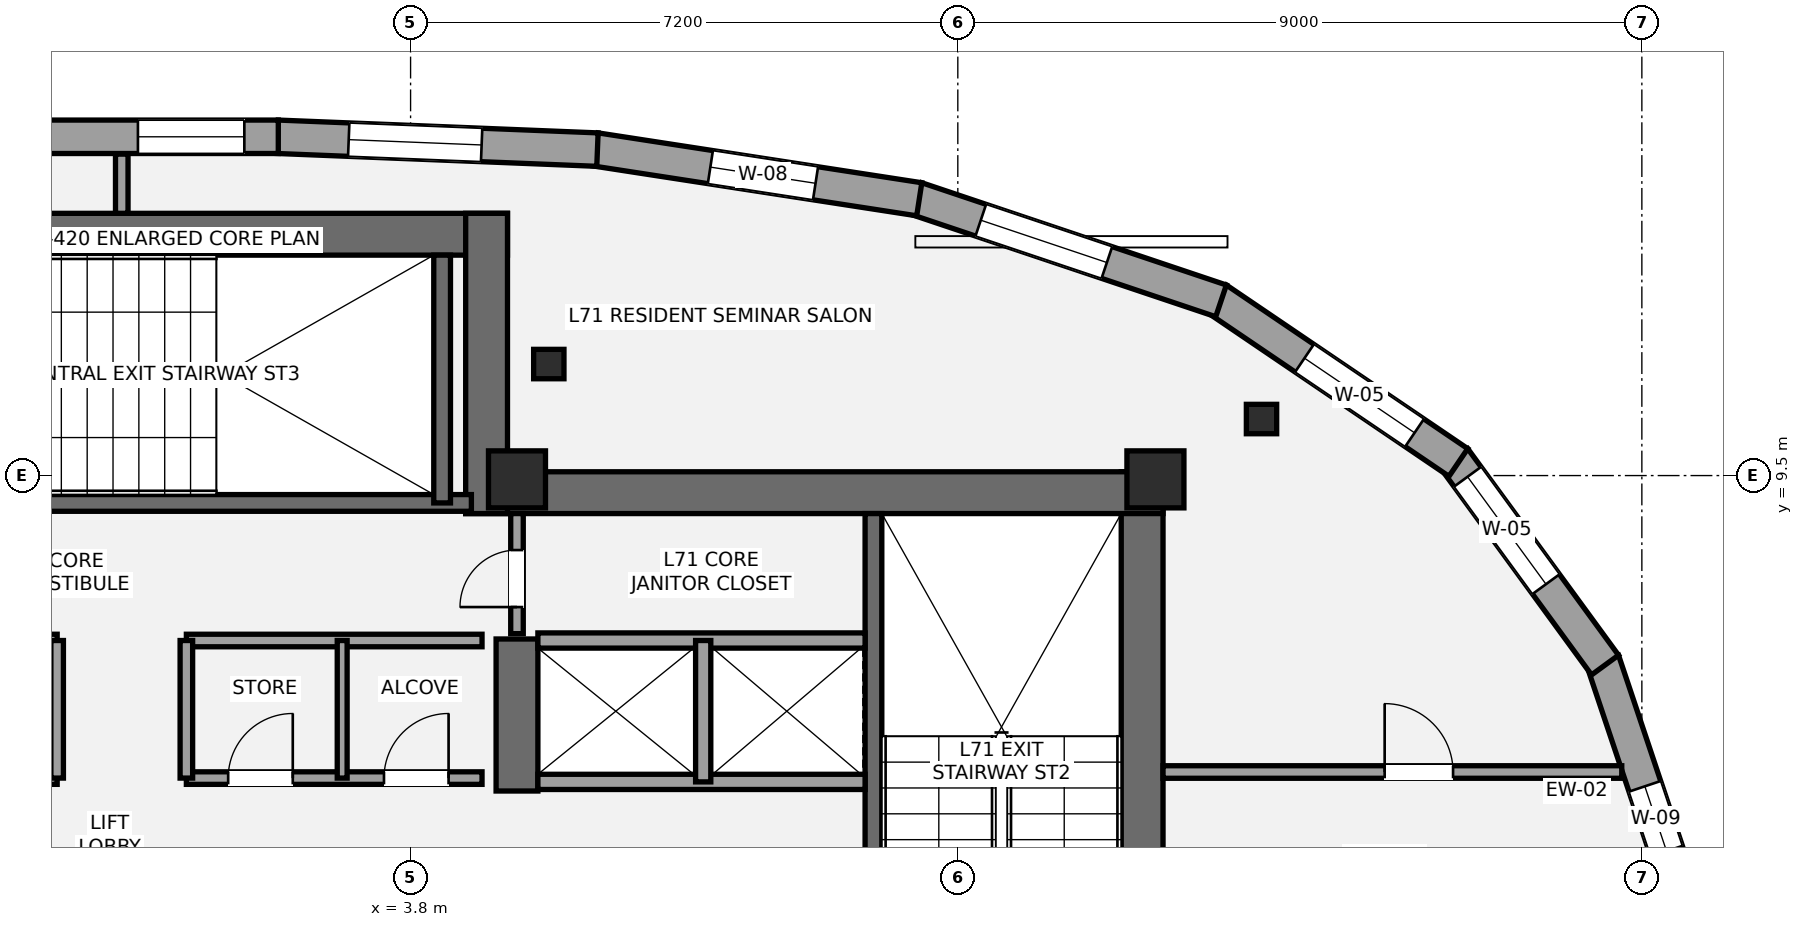
"""IFC4 building model, lengths in metres.
Left out: names, types, materials, properties, quantities, classifications, styles, units other than length and angle.
Written with IfcOpenShell. Run it as: python <this file> out.ifc"""

import sys

from ifc_helpers import new_model, si_unit, direction, frame, frame_2d, origin, origin_2d, place, context, subcontext, project, spatial, rectangle, i_section, extrude, element, fill, save


model = new_model("IFC4")
c1 = context("Model", 3, precision=1e-05, world=origin(), true_north=direction((0.0, 1.0)))
c2 = subcontext(c1, "Body", "Model", "MODEL_VIEW")
j1 = project(units=[si_unit("LENGTHUNIT", "METRE"), si_unit("PLANEANGLEUNIT", "RADIAN")], contexts=[c1])
p1 = place(None, origin())
s1 = spatial("IfcSite", under=j1, at=p1, CompositionType="ELEMENT")
p2 = place(p1, origin())
s2 = spatial("IfcBuilding", under=s1, at=p2, CompositionType="ELEMENT")
p3 = place(p2, frame((0.0, 0.0, 250.95)))
s3 = spatial("IfcBuildingStorey", under=s2, at=p3, CompositionType="ELEMENT", Elevation=250.95)
p4 = place(p3, frame((13.425, 1.3, 0.0), z_axis=(0.0, 0.0, 1.0), x_axis=(0.0, 1.0, 0.0)))
e1 = element("IfcWall", 1, at=p4, inside=s3, PredefinedType="SHEAR", context=c2, shape_type="SweptSolid", body=[
    extrude(rectangle(XDim=8.25, YDim=0.55, at=frame_2d((4.125, 0.0))), origin(), (0.0, 0.0, 1.0), 3.15),
])
p5 = place(p3, frame((4.525, 9.275, 0.0), z_axis=(0.0, 0.0, 1.0), x_axis=(1.0, 0.0, 0.0)))
e2 = element("IfcWall", 2, at=p5, inside=s3, PredefinedType="SHEAR", context=c2, shape_type="SweptSolid", body=[
    extrude(rectangle(XDim=9.175, YDim=0.55, at=frame_2d((4.587, 0.0))), origin(), (0.0, 0.0, 1.0), 3.15),
])
p6 = place(p3, frame((5.2, 5.35, 0.0), z_axis=(0.0, 0.0, 1.0), x_axis=(0.0, 1.0, 0.0)))
e3 = element("IfcWall", 3, at=p6, inside=s3, PredefinedType="SHEAR", context=c2, shape_type="SweptSolid", body=[
    extrude(rectangle(XDim=2.0, YDim=0.55, at=frame_2d((1.0, 0.0))), origin(), (0.0, 0.0, 1.0), 3.15),
])
p7 = place(p3, frame((9.89, 1.85, 0.0), z_axis=(0.0, 0.0, 1.0), x_axis=(0.0, 1.0, 0.0)))
e4 = element("IfcWall", 4, at=p7, inside=s3, PredefinedType="SHEAR", context=c2, shape_type="SweptSolid", body=[
    extrude(rectangle(XDim=7.15, YDim=0.22, at=frame_2d((3.575, 0.0))), origin(), (0.0, 0.0, 1.0), 3.15),
])
p8 = place(p3, frame((-5.075, 12.675, 0.0), z_axis=(0.0, 0.0, 1.0), x_axis=(1.0, 0.0, 0.0)))
e5 = element("IfcWall", 5, at=p8, inside=s3, PredefinedType="SHEAR", context=c2, shape_type="SweptSolid", body=[
    extrude(rectangle(XDim=10.15, YDim=0.55, at=frame_2d((5.075, 0.0))), origin(), (0.0, 0.0, 1.0), 3.15),
])
p9 = place(p3, frame((4.8, 9.0, 0.0), z_axis=(0.0, 0.0, 1.0), x_axis=(0.0, 1.0, 0.0)))
e6 = element("IfcWall", 6, at=p9, inside=s3, PredefinedType="SHEAR", context=c2, shape_type="SweptSolid", body=[
    extrude(rectangle(XDim=3.95, YDim=0.55, at=frame_2d((1.975, 0.0))), origin(), (0.0, 0.0, 1.0), 3.15),
])
p10 = place(p3, frame((-4.7, 9.14, 0.0), z_axis=(0.0, 0.0, 1.0), x_axis=(1.0, 0.0, 0.0)))
e7 = element("IfcWall", 7, at=p10, inside=s3, PredefinedType="SHEAR", context=c2, shape_type="SweptSolid", body=[
    extrude(rectangle(XDim=9.3, YDim=0.22, at=frame_2d((4.65, 0.0))), origin(), (0.0, 0.0, 1.0), 3.15),
])
p11 = place(p10, frame((1.15, 0.0, 0.0)))
e8 = element("IfcOpeningElement", 8, at=p11, cuts=e7, PredefinedType="OPENING", context=c2, shape_type="SweptSolid", body=[
    extrude(rectangle(XDim=1.05, YDim=2.15, at=frame_2d((0.525, 1.075))), frame((0.0, 0.12, 0.0), z_axis=(0.0, -1.0, 0.0), x_axis=(1.0, 0.0, 0.0)), (0.0, 0.0, 1.0), 0.24),
])
p12 = place(p3, frame((4.215, 9.14, 0.0), z_axis=(0.0, 0.0, 1.0), x_axis=(0.0, 1.0, 0.0)))
e9 = element("IfcWall", 9, at=p12, inside=s3, PredefinedType="SHEAR", context=c2, shape_type="SweptSolid", body=[
    extrude(rectangle(XDim=3.26, YDim=0.22, at=frame_2d((1.63, 0.0))), origin(), (0.0, 0.0, 1.0), 3.15),
])
for number, where, z_axis, x_axis in (
    (10, (5.2, 9.45, 0.0), (0.0, 0.0, 1.0), (1.0, 0.0, 0.0)),
    (11, (13.6, 9.45, 0.0), (0.0, 0.0, 1.0), (1.0, 0.0, 0.0)),
):
    element("IfcColumn", number, at=place(p3, frame(where, z_axis=z_axis, x_axis=x_axis)), inside=s3, PredefinedType="PILASTER", context=c2, shape_type="SweptSolid", body=[
        extrude(rectangle(XDim=0.75, YDim=0.75, at=origin_2d()), origin(), (0.0, 0.0, 1.0), 3.15),
    ])
for number, where, z_axis, x_axis in (
    (12, (14.996, 10.244, 0.0), (0.0, 0.0, 1.0), (1.0, 0.0, 0.0)),
    (13, (5.619, 10.967, 0.0), (0.0, 0.0, 1.0), (1.0, 0.0, 0.0)),
):
    element("IfcColumn", number, at=place(p3, frame(where, z_axis=z_axis, x_axis=x_axis)), inside=s3, PredefinedType="COLUMN", context=c2, shape_type="SweptSolid", body=[
        extrude(i_section(OverallWidth=0.399, OverallDepth=0.387, WebThickness=0.021, FlangeThickness=0.033, at=origin_2d()), origin(), (0.0, 0.0, 1.0), 3.15),
    ])
p13 = place(p3, frame((19.485, 7.067, 0.0), z_axis=(0.0, 0.0, 1.0), x_axis=(0.317622332961, -0.948217302945, 0.0)))
e14 = element("IfcWall", 14, at=p13, inside=s3, PredefinedType="STANDARD", context=c2, shape_type="SweptSolid", body=[
    extrude(rectangle(XDim=3.045, YDim=0.44, at=frame_2d((1.523, 0.0))), origin(), (0.0, 0.0, 1.0), 2.336),
])
p14 = place(p13, frame((1.746, 0.0, 0.58)))
e15 = element("IfcOpeningElement", 15, at=p14, cuts=e14, PredefinedType="OPENING", context=c2, shape_type="SweptSolid", body=[
    extrude(rectangle(XDim=0.9, YDim=1.35, at=frame_2d((0.45, 0.675))), frame((0.0, 0.23, 0.0), z_axis=(0.0, -1.0, 0.0), x_axis=(1.0, 0.0, 0.0)), (0.0, 0.0, 1.0), 0.46),
])
p15 = place(p3, frame((17.531, 9.724, 0.0), z_axis=(0.0, 0.0, 1.0), x_axis=(0.589698134284, -0.807623743102, 0.0)))
e16 = element("IfcWall", 16, at=p15, inside=s3, PredefinedType="STANDARD", context=c2, shape_type="SweptSolid", body=[
    extrude(rectangle(XDim=3.364, YDim=0.44, at=frame_2d((1.682, 0.0))), origin(), (0.0, 0.0, 1.0), 2.336),
])
p16 = place(p15, frame((0.297, 0.0, 0.55)))
e17 = element("IfcOpeningElement", 17, at=p16, cuts=e16, PredefinedType="OPENING", context=c2, shape_type="SweptSolid", body=[
    extrude(rectangle(XDim=1.75, YDim=1.55, at=frame_2d((0.875, 0.775))), frame((0.0, 0.23, 0.0), z_axis=(0.0, -1.0, 0.0), x_axis=(1.0, 0.0, 0.0)), (0.0, 0.0, 1.0), 0.46),
])
p17 = place(p3, frame((14.41, 11.825, 0.0), z_axis=(0.0, 0.0, 1.0), x_axis=(0.827707997274, -0.56115904274, 0.0)))
e18 = element("IfcWall", 18, at=p17, inside=s3, PredefinedType="STANDARD", context=c2, shape_type="SweptSolid", body=[
    extrude(rectangle(XDim=3.837, YDim=0.44, at=frame_2d((1.918, 0.0))), origin(), (0.0, 0.0, 1.0), 2.336),
])
p18 = place(p17, frame((1.391, 0.0, 0.55)))
e19 = element("IfcOpeningElement", 19, at=p18, cuts=e18, PredefinedType="OPENING", context=c2, shape_type="SweptSolid", body=[
    extrude(rectangle(XDim=1.75, YDim=1.55, at=frame_2d((0.875, 0.775))), frame((0.0, 0.23, 0.0), z_axis=(0.0, -1.0, 0.0), x_axis=(1.0, 0.0, 0.0)), (0.0, 0.0, 1.0), 0.46),
])
p19 = place(p3, frame((10.456, 13.144, 0.0), z_axis=(0.0, 0.0, 1.0), x_axis=(0.948005346594, -0.318254399545, 0.0)))
e20 = element("IfcWall", 20, at=p19, inside=s3, PredefinedType="STANDARD", context=c2, shape_type="SweptSolid", body=[
    extrude(rectangle(XDim=4.227, YDim=0.44, at=frame_2d((2.113, 0.0))), origin(), (0.0, 0.0, 1.0), 2.336),
])
p20 = place(p19, frame((0.892, 0.0, 0.55)))
e21 = element("IfcOpeningElement", 21, at=p20, cuts=e20, PredefinedType="OPENING", context=c2, shape_type="SweptSolid", body=[
    extrude(rectangle(XDim=1.75, YDim=1.55, at=frame_2d((0.875, 0.775))), frame((0.0, 0.23, 0.0), z_axis=(0.0, -1.0, 0.0), x_axis=(1.0, 0.0, 0.0)), (0.0, 0.0, 1.0), 0.46),
])
p21 = place(p3, frame((6.234, 13.791, 0.0), z_axis=(0.0, 0.0, 1.0), x_axis=(0.988352039028, -0.152184910389, 0.0)))
e22 = element("IfcWall", 22, at=p21, inside=s3, PredefinedType="STANDARD", context=c2, shape_type="SweptSolid", body=[
    extrude(rectangle(XDim=4.309, YDim=0.44, at=frame_2d((2.155, 0.0))), origin(), (0.0, 0.0, 1.0), 2.336),
])
p22 = place(p21, frame((1.528, 0.0, 0.55)))
e23 = element("IfcOpeningElement", 23, at=p22, cuts=e22, PredefinedType="OPENING", context=c2, shape_type="SweptSolid", body=[
    extrude(rectangle(XDim=1.4, YDim=1.55, at=frame_2d((0.7, 0.775))), frame((0.0, 0.23, 0.0), z_axis=(0.0, -1.0, 0.0), x_axis=(1.0, 0.0, 0.0)), (0.0, 0.0, 1.0), 0.46),
])
p23 = place(p3, frame((2.051, 13.957, 0.0), z_axis=(0.0, 0.0, 1.0), x_axis=(0.999195020948, -0.040116207618, 0.0)))
e24 = element("IfcWall", 24, at=p23, inside=s3, PredefinedType="STANDARD", context=c2, shape_type="SweptSolid", body=[
    extrude(rectangle(XDim=4.211, YDim=0.44, at=frame_2d((2.106, 0.0))), origin(), (0.0, 0.0, 1.0), 2.336),
])
p24 = place(p23, frame((0.936, 0.0, 0.55)))
e25 = element("IfcOpeningElement", 25, at=p24, cuts=e24, PredefinedType="OPENING", context=c2, shape_type="SweptSolid", body=[
    extrude(rectangle(XDim=1.75, YDim=1.55, at=frame_2d((0.875, 0.775))), frame((0.0, 0.23, 0.0), z_axis=(0.0, -1.0, 0.0), x_axis=(1.0, 0.0, 0.0)), (0.0, 0.0, 1.0), 0.46),
])
p25 = place(p3, frame((-2.059, 13.957, 0.0), z_axis=(0.0, 0.0, 1.0), x_axis=(1.0, 0.0, 0.0)))
e26 = element("IfcWall", 26, at=p25, inside=s3, PredefinedType="STANDARD", context=c2, shape_type="SweptSolid", body=[
    extrude(rectangle(XDim=4.119, YDim=0.44, at=frame_2d((2.059, 0.0))), origin(), (0.0, 0.0, 1.0), 2.336),
])
p26 = place(p25, frame((2.272, 0.0, 0.58)))
e27 = element("IfcOpeningElement", 27, at=p26, cuts=e26, PredefinedType="OPENING", context=c2, shape_type="SweptSolid", body=[
    extrude(rectangle(XDim=1.4, YDim=1.55, at=frame_2d((0.7, 0.775))), frame((0.0, 0.23, 0.0), z_axis=(0.0, -1.0, 0.0), x_axis=(1.0, 0.0, 0.0)), (0.0, 0.0, 1.0), 0.46),
])
for number, where, z_axis, x_axis in (
    (28, (5.475, 5.47, 0.0), (0.0, 0.0, 1.0), (1.0, 0.0, 0.0)),
    (29, (5.475, 7.33, 0.0), (0.0, 0.0, 1.0), (1.0, 0.0, 0.0)),
):
    element("IfcWall", number, at=place(p3, frame(where, z_axis=z_axis, x_axis=x_axis)), inside=s3, PredefinedType="SOLIDWALL", context=c2, shape_type="SweptSolid", body=[
        extrude(rectangle(XDim=4.305, YDim=0.2, at=frame_2d((2.152, 0.0))), origin(), (0.0, 0.0, 1.0), 2.97),
    ])
p27 = place(p3, frame((7.65, 5.47, 0.0), z_axis=(0.0, 0.0, 1.0), x_axis=(0.0, 1.0, 0.0)))
e30 = element("IfcWall", 30, at=p27, inside=s3, PredefinedType="SOLIDWALL", context=c2, shape_type="SweptSolid", body=[
    extrude(rectangle(XDim=1.86, YDim=0.2, at=frame_2d((0.93, 0.0))), origin(), (0.0, 0.0, 1.0), 2.97),
])
p28 = place(p3, frame((-4.74, 5.52, 0.0), z_axis=(0.0, 0.0, 1.0), x_axis=(1.0, 0.0, 0.0)))
e31 = element("IfcWall", 31, at=p28, inside=s3, PredefinedType="PARTITIONING", context=c2, shape_type="SweptSolid", body=[
    extrude(rectangle(XDim=3.89, YDim=0.165, at=frame_2d((1.945, 0.0))), origin(), (0.0, 0.0, 1.0), 2.97),
])
p29 = place(p28, frame((1.6, 0.0, 0.0)))
e32 = element("IfcOpeningElement", 32, at=p29, cuts=e31, PredefinedType="OPENING", context=c2, shape_type="SweptSolid", body=[
    extrude(rectangle(XDim=0.85, YDim=2.1, at=frame_2d((0.425, 1.05))), frame((0.0, 0.093, 0.0), z_axis=(0.0, -1.0, 0.0), x_axis=(1.0, 0.0, 0.0)), (0.0, 0.0, 1.0), 0.185),
])
p30 = place(p3, frame((-4.74, 7.33, 0.0), z_axis=(0.0, 0.0, 1.0), x_axis=(1.0, 0.0, 0.0)))
e33 = element("IfcWall", 33, at=p30, inside=s3, PredefinedType="PARTITIONING", context=c2, shape_type="SweptSolid", body=[
    extrude(rectangle(XDim=3.89, YDim=0.165, at=frame_2d((1.945, 0.0))), origin(), (0.0, 0.0, 1.0), 2.97),
])
p31 = place(p3, frame((-0.85, 5.52, 0.0), z_axis=(0.0, 0.0, 1.0), x_axis=(0.0, 1.0, 0.0)))
e34 = element("IfcWall", 34, at=p31, inside=s3, PredefinedType="PARTITIONING", context=c2, shape_type="SweptSolid", body=[
    extrude(rectangle(XDim=1.81, YDim=0.165, at=frame_2d((0.905, 0.0))), origin(), (0.0, 0.0, 1.0), 2.97),
])
p32 = place(p3, frame((0.85, 5.52, 0.0), z_axis=(0.0, 0.0, 1.0), x_axis=(1.0, 0.0, 0.0)))
e35 = element("IfcWall", 35, at=p32, inside=s3, PredefinedType="PARTITIONING", context=c2, shape_type="SweptSolid", body=[
    extrude(rectangle(XDim=3.89, YDim=0.165, at=frame_2d((1.945, 0.0))), origin(), (0.0, 0.0, 1.0), 2.97),
])
p33 = place(p32, frame((0.55, 0.0, 0.0)))
e36 = element("IfcOpeningElement", 36, at=p33, cuts=e35, PredefinedType="OPENING", context=c2, shape_type="SweptSolid", body=[
    extrude(rectangle(XDim=0.85, YDim=2.1, at=frame_2d((0.425, 1.05))), frame((0.0, 0.093, 0.0), z_axis=(0.0, -1.0, 0.0), x_axis=(1.0, 0.0, 0.0)), (0.0, 0.0, 1.0), 0.185),
])
p34 = place(p32, frame((2.6, 0.0, 0.0)))
e37 = element("IfcOpeningElement", 37, at=p34, cuts=e35, PredefinedType="OPENING", context=c2, shape_type="SweptSolid", body=[
    extrude(rectangle(XDim=0.85, YDim=2.1, at=frame_2d((0.425, 1.05))), frame((0.0, 0.093, 0.0), z_axis=(0.0, -1.0, 0.0), x_axis=(1.0, 0.0, 0.0)), (0.0, 0.0, 1.0), 0.185),
])
p35 = place(p3, frame((0.85, 7.33, 0.0), z_axis=(0.0, 0.0, 1.0), x_axis=(1.0, 0.0, 0.0)))
e38 = element("IfcWall", 38, at=p35, inside=s3, PredefinedType="PARTITIONING", context=c2, shape_type="SweptSolid", body=[
    extrude(rectangle(XDim=3.89, YDim=0.165, at=frame_2d((1.945, 0.0))), origin(), (0.0, 0.0, 1.0), 2.97),
])
p36 = place(p3, frame((0.85, 5.52, 0.0), z_axis=(0.0, 0.0, 1.0), x_axis=(0.0, 1.0, 0.0)))
e39 = element("IfcWall", 39, at=p36, inside=s3, PredefinedType="PARTITIONING", context=c2, shape_type="SweptSolid", body=[
    extrude(rectangle(XDim=1.81, YDim=0.165, at=frame_2d((0.905, 0.0))), origin(), (0.0, 0.0, 1.0), 2.97),
])
p37 = place(p3, frame((2.9, 5.52, 0.0), z_axis=(0.0, 0.0, 1.0), x_axis=(0.0, 1.0, 0.0)))
e40 = element("IfcWall", 40, at=p37, inside=s3, PredefinedType="PARTITIONING", context=c2, shape_type="SweptSolid", body=[
    extrude(rectangle(XDim=1.81, YDim=0.13, at=frame_2d((0.905, 0.0))), origin(), (0.0, 0.0, 1.0), 2.97),
])
p38 = place(p3, frame((5.2, 7.42, 0.0), z_axis=(0.0, 0.0, 1.0), x_axis=(0.0, 1.0, 0.0)))
e41 = element("IfcWall", 41, at=p38, inside=s3, PredefinedType="PARTITIONING", context=c2, shape_type="SweptSolid", body=[
    extrude(rectangle(XDim=1.58, YDim=0.165, at=frame_2d((0.79, 0.0))), origin(), (0.0, 0.0, 1.0), 2.97),
])
p39 = place(p38, frame((0.35, 0.0, 0.0)))
e42 = element("IfcOpeningElement", 42, at=p39, cuts=e41, PredefinedType="OPENING", context=c2, shape_type="SweptSolid", body=[
    extrude(rectangle(XDim=0.75, YDim=2.1, at=frame_2d((0.375, 1.05))), frame((0.0, 0.093, 0.0), z_axis=(0.0, -1.0, 0.0), x_axis=(1.0, 0.0, 0.0)), (0.0, 0.0, 1.0), 0.185),
])
p40 = place(p3, frame((0.0, 12.95, 0.0), z_axis=(0.0, 0.0, 1.0), x_axis=(0.0, 1.0, 0.0)))
e43 = element("IfcWall", 43, at=p40, inside=s3, PredefinedType="PARTITIONING", context=c2, shape_type="SweptSolid", body=[
    extrude(rectangle(XDim=0.779, YDim=0.165, at=frame_2d((0.39, 0.0))), origin(), (0.0, 0.0, 1.0), 2.97),
])
p41 = place(p3, frame((13.7, 5.6, 0.0), z_axis=(0.0, 0.0, 1.0), x_axis=(1.0, 0.0, 0.0)))
e44 = element("IfcWall", 44, at=p41, inside=s3, PredefinedType="PARTITIONING", context=c2, shape_type="SweptSolid", body=[
    extrude(rectangle(XDim=6.036, YDim=0.165, at=frame_2d((3.018, 0.0))), origin(), (0.0, 0.0, 1.0), 2.423),
])
p42 = place(p41, frame((2.916, 0.0, 0.0)))
e45 = element("IfcOpeningElement", 45, at=p42, cuts=e44, PredefinedType="OPENING", context=c2, shape_type="SweptSolid", body=[
    extrude(rectangle(XDim=0.9, YDim=2.1, at=frame_2d((0.45, 1.05))), frame((0.0, 0.093, 0.0), z_axis=(0.0, -1.0, 0.0), x_axis=(1.0, 0.0, 0.0)), (0.0, 0.0, 1.0), 0.185),
])
p43 = place(p14, origin())
e46 = element("IfcWindow", 46, at=p43, inside=s3, PartitioningType="SINGLE_PANEL", PredefinedType="WINDOW", context=c2, shape_type="SweptSolid", body=[
    extrude(rectangle(XDim=0.9, YDim=1.35, at=frame_2d((0.45, 0.675))), frame((0.0, -0.01, 0.0), z_axis=(0.0, -1.0, 0.0), x_axis=(1.0, 0.0, 0.0)), (0.0, 0.0, 1.0), 0.06),
])
fill(e15, e46)
p44 = place(p16, origin())
e47 = element("IfcWindow", 47, at=p44, inside=s3, PartitioningType="SINGLE_PANEL", PredefinedType="WINDOW", context=c2, shape_type="SweptSolid", body=[
    extrude(rectangle(XDim=1.75, YDim=1.55, at=frame_2d((0.875, 0.775))), frame((0.0, -0.01, 0.0), z_axis=(0.0, -1.0, 0.0), x_axis=(1.0, 0.0, 0.0)), (0.0, 0.0, 1.0), 0.06),
])
fill(e17, e47)
p45 = place(p18, origin())
e48 = element("IfcWindow", 48, at=p45, inside=s3, PartitioningType="SINGLE_PANEL", PredefinedType="WINDOW", context=c2, shape_type="SweptSolid", body=[
    extrude(rectangle(XDim=1.75, YDim=1.55, at=frame_2d((0.875, 0.775))), frame((0.0, -0.01, 0.0), z_axis=(0.0, -1.0, 0.0), x_axis=(1.0, 0.0, 0.0)), (0.0, 0.0, 1.0), 0.06),
])
fill(e19, e48)
p46 = place(p20, origin())
e49 = element("IfcWindow", 49, at=p46, inside=s3, PartitioningType="SINGLE_PANEL", PredefinedType="WINDOW", context=c2, shape_type="SweptSolid", body=[
    extrude(rectangle(XDim=1.75, YDim=1.55, at=frame_2d((0.875, 0.775))), frame((0.0, -0.01, 0.0), z_axis=(0.0, -1.0, 0.0), x_axis=(1.0, 0.0, 0.0)), (0.0, 0.0, 1.0), 0.06),
])
fill(e21, e49)
p47 = place(p22, origin())
e50 = element("IfcWindow", 50, at=p47, inside=s3, PartitioningType="SINGLE_PANEL", PredefinedType="WINDOW", context=c2, shape_type="SweptSolid", body=[
    extrude(rectangle(XDim=1.4, YDim=1.55, at=frame_2d((0.7, 0.775))), frame((0.0, -0.01, 0.0), z_axis=(0.0, -1.0, 0.0), x_axis=(1.0, 0.0, 0.0)), (0.0, 0.0, 1.0), 0.06),
])
fill(e23, e50)
p48 = place(p24, origin())
e51 = element("IfcWindow", 51, at=p48, inside=s3, PartitioningType="SINGLE_PANEL", PredefinedType="WINDOW", context=c2, shape_type="SweptSolid", body=[
    extrude(rectangle(XDim=1.75, YDim=1.55, at=frame_2d((0.875, 0.775))), frame((0.0, -0.01, 0.0), z_axis=(0.0, -1.0, 0.0), x_axis=(1.0, 0.0, 0.0)), (0.0, 0.0, 1.0), 0.06),
])
fill(e25, e51)
p49 = place(p26, origin())
e52 = element("IfcWindow", 52, at=p49, inside=s3, PartitioningType="SINGLE_PANEL", PredefinedType="WINDOW", context=c2, shape_type="SweptSolid", body=[
    extrude(rectangle(XDim=1.4, YDim=1.55, at=frame_2d((0.7, 0.775))), frame((0.0, -0.01, 0.0), z_axis=(0.0, -1.0, 0.0), x_axis=(1.0, 0.0, 0.0)), (0.0, 0.0, 1.0), 0.06),
])
fill(e27, e52)
p50 = place(p33, origin())
e53 = element("IfcDoor", 53, at=p50, inside=s3, OperationType="SINGLE_SWING_RIGHT", PredefinedType="DOOR", context=c2, shape_type="SweptSolid", body=[
    extrude(rectangle(XDim=0.85, YDim=2.1, at=frame_2d((0.425, 1.05))), frame((0.0, 0.025, 0.0), z_axis=(0.0, -1.0, 0.0), x_axis=(1.0, 0.0, 0.0)), (0.0, 0.0, 1.0), 0.05),
])
fill(e36, e53)
p51 = place(p34, origin())
e54 = element("IfcDoor", 54, at=p51, inside=s3, OperationType="SINGLE_SWING_RIGHT", PredefinedType="DOOR", context=c2, shape_type="SweptSolid", body=[
    extrude(rectangle(XDim=0.85, YDim=2.1, at=frame_2d((0.425, 1.05))), frame((0.0, 0.025, 0.0), z_axis=(0.0, -1.0, 0.0), x_axis=(1.0, 0.0, 0.0)), (0.0, 0.0, 1.0), 0.05),
])
fill(e37, e54)
p52 = place(p39, origin())
e55 = element("IfcDoor", 55, at=p52, inside=s3, OperationType="SINGLE_SWING_LEFT", PredefinedType="DOOR", context=c2, shape_type="SweptSolid", body=[
    extrude(rectangle(XDim=0.75, YDim=2.1, at=frame_2d((0.375, 1.05))), frame((0.0, 0.025, 0.0), z_axis=(0.0, -1.0, 0.0), x_axis=(1.0, 0.0, 0.0)), (0.0, 0.0, 1.0), 0.05),
])
fill(e42, e55)
p53 = place(p42, origin())
e56 = element("IfcDoor", 56, at=p53, inside=s3, OperationType="SINGLE_SWING_LEFT", PredefinedType="DOOR", context=c2, shape_type="SweptSolid", body=[
    extrude(rectangle(XDim=0.9, YDim=2.1, at=frame_2d((0.45, 1.05))), frame((0.0, 0.025, 0.0), z_axis=(0.0, -1.0, 0.0), x_axis=(1.0, 0.0, 0.0)), (0.0, 0.0, 1.0), 0.05),
])
fill(e45, e56)
save(model, sys.argv[1])
